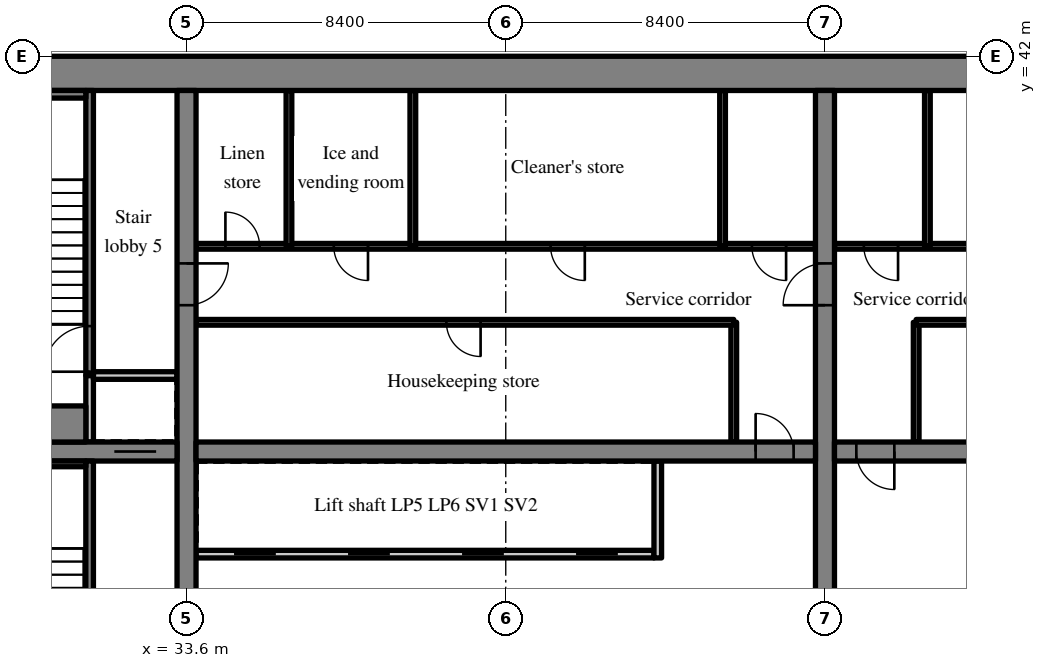
"""IFC4 building model, lengths in metres.
Left out: names, types, materials, properties, quantities, classifications, styles, units other than length and angle.
Written with IfcOpenShell. Run it as: python <this file> out.ifc"""

import sys

from ifc_helpers import new_model, si_unit, direction, frame, frame_2d, origin, place, context, subcontext, project, spatial, rectangle, extrude, source, transform, mapped, element, fill, save


model = new_model("IFC4")
c1 = context("Model", 3, precision=1e-05, world=origin(), true_north=direction((0.0, 1.0)))
c2 = subcontext(c1, "Body", "Model", "MODEL_VIEW")
j1 = project(units=[si_unit("LENGTHUNIT", "METRE"), si_unit("PLANEANGLEUNIT", "RADIAN")], contexts=[c1])
p1 = place(None, origin())
s1 = spatial("IfcSite", under=j1, at=p1, CompositionType="ELEMENT")
p2 = place(p1, origin())
s2 = spatial("IfcBuilding", under=s1, at=p2, CompositionType="ELEMENT")
p3 = place(p2, frame((0.0, 0.0, 129.4)))
s3 = spatial("IfcBuildingStorey", under=s2, at=p3, CompositionType="ELEMENT", Elevation=129.4)
m1 = source(origin(), c2, "Body", "SweptSolid", [
    extrude(rectangle(XDim=50.4, YDim=0.9, at=frame_2d((25.2, 0.0))), origin(), (0.0, 0.0, 1.0), 3.52),
])
p4 = place(p3, frame((25.2, 41.55, 0.0), z_axis=(0.0, 0.0, 1.0), x_axis=(1.0, 0.0, 0.0)))
e1 = element("IfcWall", 1, at=p4, inside=s3, PredefinedType="SHEAR", context=c2, shape_type="MappedRepresentation", body=[
    mapped(m1, transform((0.0, 0.0, 0.0), scale=1.0)),
])
m2 = source(origin(), c2, "Body", "SweptSolid", [
    extrude(rectangle(XDim=18.2, YDim=0.5, at=frame_2d((9.1, 0.0))), origin(), (0.0, 0.0, 1.0), 3.52),
])
p5 = place(p3, frame((33.6, 22.9, 0.0), z_axis=(0.0, 0.0, 1.0), x_axis=(0.0, 1.0, 0.0)))
e2 = element("IfcWall", 2, at=p5, inside=s3, PredefinedType="SHEAR", context=c2, shape_type="MappedRepresentation", body=[
    mapped(m2, transform((0.0, 0.0, 0.0), scale=1.0)),
])
m3 = source(origin(), c2, "Body", "SweptSolid", [
    extrude(rectangle(XDim=1.1, YDim=2.1, at=frame_2d((0.55, 1.05))), frame((0.0, 0.26, 0.0), z_axis=(0.0, -1.0, 0.0), x_axis=(1.0, 0.0, 0.0)), (0.0, 0.0, 1.0), 0.52),
])
p6 = place(p5, frame((12.55, 0.0, 0.0)))
e3 = element("IfcOpeningElement", 3, at=p6, cuts=e2, PredefinedType="OPENING", context=c2, shape_type="MappedRepresentation", body=[
    mapped(m3, transform((0.0, 0.0, 0.0), scale=1.0)),
])
p7 = place(p3, frame((50.4, 22.9, 0.0), z_axis=(0.0, 0.0, 1.0), x_axis=(0.0, 1.0, 0.0)))
e4 = element("IfcWall", 4, at=p7, inside=s3, PredefinedType="SHEAR", context=c2, shape_type="MappedRepresentation", body=[
    mapped(m2, transform((0.0, 0.0, 0.0), scale=1.0)),
])
p8 = place(p7, frame((12.55, 0.0, 0.0)))
e5 = element("IfcOpeningElement", 5, at=p8, cuts=e4, PredefinedType="OPENING", context=c2, shape_type="MappedRepresentation", body=[
    mapped(m3, transform((0.0, 0.0, 0.0), scale=1.0)),
])
m4 = source(origin(), c2, "Body", "SweptSolid", [
    extrude(rectangle(XDim=7.25, YDim=0.5, at=frame_2d((3.625, 0.0))), origin(), (0.0, 0.0, 1.0), 3.52),
])
p9 = place(p3, frame((26.1, 31.6, 0.0), z_axis=(0.0, 0.0, 1.0), x_axis=(1.0, 0.0, 0.0)))
e6 = element("IfcWall", 6, at=p9, inside=s3, PredefinedType="SHEAR", context=c2, shape_type="MappedRepresentation", body=[
    mapped(m4, transform((0.0, 0.0, 0.0), scale=1.0)),
])
p10 = place(p9, frame((5.6, 0.0, 0.0)))
e7 = element("IfcOpeningElement", 7, at=p10, cuts=e6, PredefinedType="OPENING", context=c2, shape_type="MappedRepresentation", body=[
    mapped(m3, transform((0.0, 0.0, 0.0), scale=1.0)),
])
m5 = source(origin(), c2, "Body", "SweptSolid", [
    extrude(rectangle(XDim=16.3, YDim=0.5, at=frame_2d((8.15, 0.0))), origin(), (0.0, 0.0, 1.0), 3.52),
])
p11 = place(p3, frame((33.85, 31.6, 0.0), z_axis=(0.0, 0.0, 1.0), x_axis=(1.0, 0.0, 0.0)))
e8 = element("IfcWall", 8, at=p11, inside=s3, PredefinedType="SHEAR", context=c2, shape_type="MappedRepresentation", body=[
    mapped(m5, transform((0.0, 0.0, 0.0), scale=1.0)),
])
m6 = source(origin(), c2, "Body", "SweptSolid", [
    extrude(rectangle(XDim=1.0, YDim=2.1, at=frame_2d((0.5, 1.05))), frame((0.0, 0.26, 0.0), z_axis=(0.0, -1.0, 0.0), x_axis=(1.0, 0.0, 0.0)), (0.0, 0.0, 1.0), 0.52),
])
p12 = place(p11, frame((14.725, 0.0, 0.0)))
e9 = element("IfcOpeningElement", 9, at=p12, cuts=e8, PredefinedType="OPENING", context=c2, shape_type="MappedRepresentation", body=[
    mapped(m6, transform((0.0, 0.0, 0.0), scale=1.0)),
])
m7 = source(origin(), c2, "Body", "SweptSolid", [
    extrude(rectangle(XDim=16.3, YDim=0.5, at=frame_2d((8.15, 0.0))), origin(), (0.0, 0.0, 1.0), 3.52),
])
p13 = place(p3, frame((50.65, 31.6, 0.0), z_axis=(0.0, 0.0, 1.0), x_axis=(1.0, 0.0, 0.0)))
e10 = element("IfcWall", 10, at=p13, inside=s3, PredefinedType="SHEAR", context=c2, shape_type="MappedRepresentation", body=[
    mapped(m7, transform((0.0, 0.0, 0.0), scale=1.0)),
])
p14 = place(p13, frame((0.575, 0.0, 0.0)))
e11 = element("IfcOpeningElement", 11, at=p14, cuts=e10, PredefinedType="OPENING", context=c2, shape_type="MappedRepresentation", body=[
    mapped(m6, transform((0.0, 0.0, 0.0), scale=1.0)),
])
m8 = source(origin(), c2, "Body", "SweptSolid", [
    extrude(rectangle(XDim=12.05, YDim=0.2, at=frame_2d((6.025, 0.0))), origin(), (0.0, 0.0, 1.0), 3.52),
])
p15 = place(p3, frame((33.85, 28.9, 0.0), z_axis=(0.0, 0.0, 1.0), x_axis=(1.0, 0.0, 0.0)))
e12 = element("IfcWall", 12, at=p15, inside=s3, PredefinedType="SOLIDWALL", context=c2, shape_type="MappedRepresentation", body=[
    mapped(m8, transform((0.0, 0.0, 0.0), scale=1.0)),
])
m9 = source(origin(), c2, "Body", "SweptSolid", [
    extrude(rectangle(XDim=1.1, YDim=2.1, at=frame_2d((0.55, 1.05))), frame((0.0, 0.11, 0.0), z_axis=(0.0, -1.0, 0.0), x_axis=(1.0, 0.0, 0.0)), (0.0, 0.0, 1.0), 0.22),
])
p16 = place(p15, frame((1.0, 0.0, 0.0)))
e13 = element("IfcOpeningElement", 13, at=p16, cuts=e12, PredefinedType="OPENING", context=c2, shape_type="MappedRepresentation", body=[
    mapped(m9, transform((0.0, 0.0, 0.0), scale=1.0)),
])
p17 = place(p15, frame((4.0, 0.0, 0.0)))
e14 = element("IfcOpeningElement", 14, at=p17, cuts=e12, PredefinedType="OPENING", context=c2, shape_type="MappedRepresentation", body=[
    mapped(m9, transform((0.0, 0.0, 0.0), scale=1.0)),
])
p18 = place(p15, frame((7.0, 0.0, 0.0)))
e15 = element("IfcOpeningElement", 15, at=p18, cuts=e12, PredefinedType="OPENING", context=c2, shape_type="MappedRepresentation", body=[
    mapped(m9, transform((0.0, 0.0, 0.0), scale=1.0)),
])
p19 = place(p15, frame((10.0, 0.0, 0.0)))
e16 = element("IfcOpeningElement", 16, at=p19, cuts=e12, PredefinedType="OPENING", context=c2, shape_type="MappedRepresentation", body=[
    mapped(m9, transform((0.0, 0.0, 0.0), scale=1.0)),
])
m10 = source(origin(), c2, "Body", "SweptSolid", [
    extrude(rectangle(XDim=2.55, YDim=0.2, at=frame_2d((1.275, 0.0))), origin(), (0.0, 0.0, 1.0), 3.52),
])
p20 = place(p3, frame((46.0, 28.8, 0.0), z_axis=(0.0, 0.0, 1.0), x_axis=(0.0, 1.0, 0.0)))
e17 = element("IfcWall", 17, at=p20, inside=s3, PredefinedType="SOLIDWALL", context=c2, shape_type="MappedRepresentation", body=[
    mapped(m10, transform((0.0, 0.0, 0.0), scale=1.0)),
])
m11 = source(origin(), c2, "Body", "SweptSolid", [
    extrude(rectangle(XDim=3.15, YDim=0.15, at=frame_2d((1.575, 0.0))), origin(), (0.0, 0.0, 1.0), 3.52),
])
p21 = place(p3, frame((48.0, 31.85, 0.0), z_axis=(0.0, 0.0, 1.0), x_axis=(0.0, 1.0, 0.0)))
e18 = element("IfcWall", 18, at=p21, inside=s3, PredefinedType="PARTITIONING", context=c2, shape_type="MappedRepresentation", body=[
    mapped(m11, transform((0.0, 0.0, 0.0), scale=1.0)),
])
m12 = source(origin(), c2, "Body", "SweptSolid", [
    extrude(rectangle(XDim=14.15, YDim=0.15, at=frame_2d((7.075, 0.0))), origin(), (0.0, 0.0, 1.0), 3.52),
])
p22 = place(p3, frame((33.85, 35.0, 0.0), z_axis=(0.0, 0.0, 1.0), x_axis=(1.0, 0.0, 0.0)))
e19 = element("IfcWall", 19, at=p22, inside=s3, PredefinedType="PARTITIONING", context=c2, shape_type="MappedRepresentation", body=[
    mapped(m12, transform((0.0, 0.0, 0.0), scale=1.0)),
])
m13 = source(origin(), c2, "Body", "SweptSolid", [
    extrude(rectangle(XDim=0.9, YDim=2.1, at=frame_2d((0.45, 1.05))), frame((0.0, 0.085, 0.0), z_axis=(0.0, -1.0, 0.0), x_axis=(1.0, 0.0, 0.0)), (0.0, 0.0, 1.0), 0.17),
])
p23 = place(p22, frame((6.588, 0.0, 0.0)))
e20 = element("IfcOpeningElement", 20, at=p23, cuts=e19, PredefinedType="OPENING", context=c2, shape_type="MappedRepresentation", body=[
    mapped(m13, transform((0.0, 0.0, 0.0), scale=1.0)),
])
m14 = source(origin(), c2, "Body", "SweptSolid", [
    extrude(rectangle(XDim=16.3, YDim=0.15, at=frame_2d((8.15, 0.0))), origin(), (0.0, 0.0, 1.0), 3.52),
])
p24 = place(p3, frame((33.85, 37.0, 0.0), z_axis=(0.0, 0.0, 1.0), x_axis=(1.0, 0.0, 0.0)))
e21 = element("IfcWall", 21, at=p24, inside=s3, PredefinedType="PARTITIONING", context=c2, shape_type="MappedRepresentation", body=[
    mapped(m14, transform((0.0, 0.0, 0.0), scale=1.0)),
])
p25 = place(p24, frame((0.773, 0.0, 0.0)))
e22 = element("IfcOpeningElement", 22, at=p25, cuts=e21, PredefinedType="OPENING", context=c2, shape_type="MappedRepresentation", body=[
    mapped(m13, transform((0.0, 0.0, 0.0), scale=1.0)),
])
p26 = place(p24, frame((3.625, 0.0, 0.0)))
e23 = element("IfcOpeningElement", 23, at=p26, cuts=e21, PredefinedType="OPENING", context=c2, shape_type="MappedRepresentation", body=[
    mapped(m13, transform((0.0, 0.0, 0.0), scale=1.0)),
])
p27 = place(p24, frame((9.33, 0.0, 0.0)))
e24 = element("IfcOpeningElement", 24, at=p27, cuts=e21, PredefinedType="OPENING", context=c2, shape_type="MappedRepresentation", body=[
    mapped(m13, transform((0.0, 0.0, 0.0), scale=1.0)),
])
p28 = place(p24, frame((14.627, 0.0, 0.0)))
e25 = element("IfcOpeningElement", 25, at=p28, cuts=e21, PredefinedType="OPENING", context=c2, shape_type="MappedRepresentation", body=[
    mapped(m13, transform((0.0, 0.0, 0.0), scale=1.0)),
])
m15 = source(origin(), c2, "Body", "SweptSolid", [
    extrude(rectangle(XDim=4.1, YDim=0.15, at=frame_2d((2.05, 0.0))), origin(), (0.0, 0.0, 1.0), 3.52),
])
for number, where, z_axis, x_axis in (
    (26, (36.295, 37.0, 0.0), (0.0, 0.0, 1.0), (0.0, 1.0, 0.0)),
    (27, (39.555, 37.0, 0.0), (0.0, 0.0, 1.0), (0.0, 1.0, 0.0)),
    (28, (47.705, 37.0, 0.0), (0.0, 0.0, 1.0), (0.0, 1.0, 0.0)),
):
    element("IfcWall", number, at=place(p3, frame(where, z_axis=z_axis, x_axis=x_axis)), inside=s3, PredefinedType="PARTITIONING", context=c2, shape_type="MappedRepresentation", body=[
        mapped(m15, transform((0.0, 0.0, 0.0), scale=1.0)),
    ])
p29 = place(p3, frame((52.8, 31.85, 0.0), z_axis=(0.0, 0.0, 1.0), x_axis=(0.0, 1.0, 0.0)))
e29 = element("IfcWall", 29, at=p29, inside=s3, PredefinedType="PARTITIONING", context=c2, shape_type="MappedRepresentation", body=[
    mapped(m11, transform((0.0, 0.0, 0.0), scale=1.0)),
])
p30 = place(p3, frame((66.95, 35.0, 0.0), z_axis=(0.0, 0.0, 1.0), x_axis=(-1.0, 0.0, 0.0)))
e30 = element("IfcWall", 30, at=p30, inside=s3, PredefinedType="PARTITIONING", context=c2, shape_type="MappedRepresentation", body=[
    mapped(m12, transform((0.0, 0.0, 0.0), scale=1.0)),
])
p31 = place(p30, frame((3.421, 0.0, 0.0)))
e31 = element("IfcOpeningElement", 31, at=p31, cuts=e30, PredefinedType="OPENING", context=c2, shape_type="MappedRepresentation", body=[
    mapped(m13, transform((0.0, 0.0, 0.0), scale=1.0)),
])
p32 = place(p30, frame((10.458, 0.0, 0.0)))
e32 = element("IfcOpeningElement", 32, at=p32, cuts=e30, PredefinedType="OPENING", context=c2, shape_type="MappedRepresentation", body=[
    mapped(m13, transform((0.0, 0.0, 0.0), scale=1.0)),
])
m16 = source(origin(), c2, "Body", "SweptSolid", [
    extrude(rectangle(XDim=16.3, YDim=0.15, at=frame_2d((8.15, 0.0))), origin(), (0.0, 0.0, 1.0), 3.52),
])
p33 = place(p3, frame((66.95, 37.0, 0.0), z_axis=(0.0, 0.0, 1.0), x_axis=(-1.0, 0.0, 0.0)))
e33 = element("IfcWall", 33, at=p33, inside=s3, PredefinedType="PARTITIONING", context=c2, shape_type="MappedRepresentation", body=[
    mapped(m16, transform((0.0, 0.0, 0.0), scale=1.0)),
])
p34 = place(p33, frame((6.478, 0.0, 0.0)))
e34 = element("IfcOpeningElement", 34, at=p34, cuts=e33, PredefinedType="OPENING", context=c2, shape_type="MappedRepresentation", body=[
    mapped(m13, transform((0.0, 0.0, 0.0), scale=1.0)),
])
p35 = place(p33, frame((14.627, 0.0, 0.0)))
e35 = element("IfcOpeningElement", 35, at=p35, cuts=e33, PredefinedType="OPENING", context=c2, shape_type="MappedRepresentation", body=[
    mapped(m13, transform((0.0, 0.0, 0.0), scale=1.0)),
])
p36 = place(p3, frame((53.095, 37.0, 0.0), z_axis=(0.0, 0.0, 1.0), x_axis=(0.0, 1.0, 0.0)))
e36 = element("IfcWall", 36, at=p36, inside=s3, PredefinedType="PARTITIONING", context=c2, shape_type="MappedRepresentation", body=[
    mapped(m15, transform((0.0, 0.0, 0.0), scale=1.0)),
])
m17 = source(origin(), c2, "Body", "SweptSolid", [
    extrude(rectangle(XDim=8.45, YDim=0.2, at=frame_2d((4.225, 0.0))), origin(), (0.0, 0.0, 1.0), 3.52),
])
p37 = place(p3, frame((31.05, 22.9, 0.0), z_axis=(0.0, 0.0, 1.0), x_axis=(0.0, 1.0, 0.0)))
e37 = element("IfcWall", 37, at=p37, inside=s3, PredefinedType="SOLIDWALL", context=c2, shape_type="MappedRepresentation", body=[
    mapped(m17, transform((0.0, 0.0, 0.0), scale=1.0)),
])
m18 = source(origin(), c2, "Body", "SweptSolid", [
    extrude(rectangle(XDim=1.2, YDim=2.1, at=frame_2d((0.6, 1.05))), frame((0.0, 0.11, 0.0), z_axis=(0.0, -1.0, 0.0), x_axis=(1.0, 0.0, 0.0)), (0.0, 0.0, 1.0), 0.22),
])
p38 = place(p37, frame((0.7, 0.0, 0.0)))
e38 = element("IfcOpeningElement", 38, at=p38, cuts=e37, PredefinedType="OPENING", context=c2, shape_type="MappedRepresentation", body=[
    mapped(m18, transform((0.0, 0.0, 0.0), scale=1.0)),
])
m19 = source(origin(), c2, "Body", "SweptSolid", [
    extrude(rectangle(XDim=1.75, YDim=0.2, at=frame_2d((0.875, 0.0))), origin(), (0.0, 0.0, 1.0), 3.52),
])
p39 = place(p3, frame((31.05, 31.85, 0.0), z_axis=(0.0, 0.0, 1.0), x_axis=(0.0, 1.0, 0.0)))
e39 = element("IfcWall", 39, at=p39, inside=s3, PredefinedType="SOLIDWALL", context=c2, shape_type="MappedRepresentation", body=[
    mapped(m19, transform((0.0, 0.0, 0.0), scale=1.0)),
])
m20 = source(origin(), c2, "Body", "SweptSolid", [
    extrude(rectangle(XDim=2.2, YDim=0.2, at=frame_2d((1.1, 0.0))), origin(), (0.0, 0.0, 1.0), 3.52),
])
p40 = place(p3, frame((31.15, 33.6, 0.0), z_axis=(0.0, 0.0, 1.0), x_axis=(1.0, 0.0, 0.0)))
e40 = element("IfcWall", 40, at=p40, inside=s3, PredefinedType="SOLIDWALL", context=c2, shape_type="MappedRepresentation", body=[
    mapped(m20, transform((0.0, 0.0, 0.0), scale=1.0)),
])
m21 = source(origin(), c2, "Body", "SweptSolid", [
    extrude(rectangle(XDim=7.5, YDim=0.2, at=frame_2d((3.75, 0.0))), origin(), (0.0, 0.0, 1.0), 3.52),
])
p41 = place(p3, frame((31.05, 33.6, 0.0), z_axis=(0.0, 0.0, 1.0), x_axis=(0.0, 1.0, 0.0)))
e41 = element("IfcWall", 41, at=p41, inside=s3, PredefinedType="SOLIDWALL", context=c2, shape_type="MappedRepresentation", body=[
    mapped(m21, transform((0.0, 0.0, 0.0), scale=1.0)),
])
p42 = place(p41, frame((0.1, 0.0, 0.0)))
e42 = element("IfcOpeningElement", 42, at=p42, cuts=e41, PredefinedType="OPENING", context=c2, shape_type="MappedRepresentation", body=[
    mapped(m18, transform((0.0, 0.0, 0.0), scale=1.0)),
])
m22 = source(origin(), c2, "Body", "SweptSolid", [
    extrude(rectangle(XDim=4.85, YDim=0.15, at=frame_2d((2.425, 0.0))), origin(), (0.0, 0.0, 1.0), 3.52),
])
p43 = place(p3, frame((26.1, 31.275, 0.0), z_axis=(0.0, 0.0, 1.0), x_axis=(1.0, 0.0, 0.0)))
e43 = element("IfcWall", 43, at=p43, inside=s3, PredefinedType="SOLIDWALL", context=c2, shape_type="MappedRepresentation", body=[
    mapped(m22, transform((0.0, 0.0, 0.0), scale=1.0)),
])
m23 = source(origin(), c2, "Body", "SweptSolid", [
    extrude(rectangle(XDim=4.85, YDim=0.2, at=frame_2d((2.425, 0.0))), origin(), (0.0, 0.0, 1.0), 3.52),
])
p44 = place(p3, frame((26.1, 41.0, 0.0), z_axis=(0.0, 0.0, 1.0), x_axis=(1.0, 0.0, 0.0)))
e44 = element("IfcWall", 44, at=p44, inside=s3, PredefinedType="SOLIDWALL", context=c2, shape_type="MappedRepresentation", body=[
    mapped(m23, transform((0.0, 0.0, 0.0), scale=1.0)),
])
m24 = source(origin(), c2, "Body", "SweptSolid", [
    extrude(rectangle(XDim=4.85, YDim=0.95, at=frame_2d((2.425, 0.0))), origin(), (0.0, 0.0, 1.0), 3.52),
])
p45 = place(p3, frame((26.1, 32.325, 0.0), z_axis=(0.0, 0.0, 1.0), x_axis=(1.0, 0.0, 0.0)))
e45 = element("IfcWall", 45, at=p45, inside=s3, PredefinedType="SOLIDWALL", context=c2, shape_type="MappedRepresentation", body=[
    mapped(m24, transform((0.0, 0.0, 0.0), scale=1.0)),
])
m25 = source(origin(), c2, "Body", "SweptSolid", [
    extrude(rectangle(XDim=1.0, YDim=2.1, at=frame_2d((0.5, 1.05))), frame((0.0, 0.025, 0.0), z_axis=(0.0, -1.0, 0.0), x_axis=(1.0, 0.0, 0.0)), (0.0, 0.0, 1.0), 0.05),
])
p46 = place(p12, origin())
e46 = element("IfcDoor", 46, at=p46, inside=s3, OperationType="SINGLE_SWING_LEFT", PredefinedType="DOOR", context=c2, shape_type="MappedRepresentation", body=[
    mapped(m25, transform((0.0, 0.0, 0.0), scale=1.0)),
])
fill(e9, e46)
m26 = source(origin(), c2, "Body", "SweptSolid", [
    extrude(rectangle(XDim=1.1, YDim=2.1, at=frame_2d((0.55, 1.05))), frame((0.0, 0.025, 0.0), z_axis=(0.0, -1.0, 0.0), x_axis=(1.0, 0.0, 0.0)), (0.0, 0.0, 1.0), 0.05),
])
p47 = place(p16, origin())
e47 = element("IfcDoor", 47, at=p47, inside=s3, OperationType="SLIDING_TO_LEFT", PredefinedType="DOOR", context=c2, shape_type="MappedRepresentation", body=[
    mapped(m26, transform((0.0, 0.0, 0.0), scale=1.0)),
])
fill(e13, e47)
p48 = place(p17, origin())
e48 = element("IfcDoor", 48, at=p48, inside=s3, OperationType="SLIDING_TO_RIGHT", PredefinedType="DOOR", context=c2, shape_type="MappedRepresentation", body=[
    mapped(m26, transform((0.0, 0.0, 0.0), scale=1.0)),
])
fill(e14, e48)
p49 = place(p18, origin())
e49 = element("IfcDoor", 49, at=p49, inside=s3, OperationType="SLIDING_TO_LEFT", PredefinedType="DOOR", context=c2, shape_type="MappedRepresentation", body=[
    mapped(m26, transform((0.0, 0.0, 0.0), scale=1.0)),
])
fill(e15, e49)
p50 = place(p19, origin())
e50 = element("IfcDoor", 50, at=p50, inside=s3, OperationType="SLIDING_TO_RIGHT", PredefinedType="DOOR", context=c2, shape_type="MappedRepresentation", body=[
    mapped(m26, transform((0.0, 0.0, 0.0), scale=1.0)),
])
fill(e16, e50)
m27 = source(origin(), c2, "Body", "SweptSolid", [
    extrude(rectangle(XDim=0.9, YDim=2.1, at=frame_2d((0.45, 1.05))), frame((0.0, 0.025, 0.0), z_axis=(0.0, -1.0, 0.0), x_axis=(1.0, 0.0, 0.0)), (0.0, 0.0, 1.0), 0.05),
])
p51 = place(p23, origin())
e51 = element("IfcDoor", 51, at=p51, inside=s3, OperationType="SINGLE_SWING_RIGHT", PredefinedType="DOOR", context=c2, shape_type="MappedRepresentation", body=[
    mapped(m27, transform((0.0, 0.0, 0.0), scale=1.0)),
])
fill(e20, e51)
p52 = place(p25, origin())
e52 = element("IfcDoor", 52, at=p52, inside=s3, OperationType="SINGLE_SWING_LEFT", PredefinedType="DOOR", context=c2, shape_type="MappedRepresentation", body=[
    mapped(m27, transform((0.0, 0.0, 0.0), scale=1.0)),
])
fill(e22, e52)
p53 = place(p26, origin())
e53 = element("IfcDoor", 53, at=p53, inside=s3, OperationType="SINGLE_SWING_RIGHT", PredefinedType="DOOR", context=c2, shape_type="MappedRepresentation", body=[
    mapped(m27, transform((0.0, 0.0, 0.0), scale=1.0)),
])
fill(e23, e53)
p54 = place(p27, origin())
e54 = element("IfcDoor", 54, at=p54, inside=s3, OperationType="SINGLE_SWING_RIGHT", PredefinedType="DOOR", context=c2, shape_type="MappedRepresentation", body=[
    mapped(m27, transform((0.0, 0.0, 0.0), scale=1.0)),
])
fill(e24, e54)
p55 = place(p28, origin())
e55 = element("IfcDoor", 55, at=p55, inside=s3, OperationType="SINGLE_SWING_RIGHT", PredefinedType="DOOR", context=c2, shape_type="MappedRepresentation", body=[
    mapped(m27, transform((0.0, 0.0, 0.0), scale=1.0)),
])
fill(e25, e55)
p56 = place(p14, origin())
e56 = element("IfcDoor", 56, at=p56, inside=s3, OperationType="SINGLE_SWING_RIGHT", PredefinedType="DOOR", context=c2, shape_type="MappedRepresentation", body=[
    mapped(m25, transform((0.0, 0.0, 0.0), scale=1.0)),
])
fill(e11, e56)
p57 = place(p35, origin())
e57 = element("IfcDoor", 57, at=p57, inside=s3, OperationType="SINGLE_SWING_LEFT", PredefinedType="DOOR", context=c2, shape_type="MappedRepresentation", body=[
    mapped(m27, transform((0.0, 0.0, 0.0), scale=1.0)),
])
fill(e35, e57)
p58 = place(p10, origin())
e58 = element("IfcDoor", 58, at=p58, inside=s3, OperationType="SLIDING_TO_LEFT", PredefinedType="DOOR", context=c2, shape_type="MappedRepresentation", body=[
    mapped(m26, transform((0.0, 0.0, 0.0), scale=1.0)),
])
fill(e7, e58)
m28 = source(origin(), c2, "Body", "SweptSolid", [
    extrude(rectangle(XDim=1.2, YDim=2.1, at=frame_2d((0.6, 1.05))), frame((0.0, 0.025, 0.0), z_axis=(0.0, -1.0, 0.0), x_axis=(1.0, 0.0, 0.0)), (0.0, 0.0, 1.0), 0.05),
])
p59 = place(p42, origin())
e59 = element("IfcDoor", 59, at=p59, inside=s3, OperationType="SINGLE_SWING_LEFT", PredefinedType="DOOR", context=c2, shape_type="MappedRepresentation", body=[
    mapped(m28, transform((0.0, 0.0, 0.0), scale=1.0)),
])
fill(e42, e59)
p60 = place(p6, origin())
e60 = element("IfcDoor", 60, at=p60, inside=s3, OperationType="SINGLE_SWING_RIGHT", PredefinedType="DOOR", context=c2, shape_type="MappedRepresentation", body=[
    mapped(m26, transform((0.0, 0.0, 0.0), scale=1.0)),
])
fill(e3, e60)
p61 = place(p8, origin())
e61 = element("IfcDoor", 61, at=p61, inside=s3, OperationType="SINGLE_SWING_LEFT", PredefinedType="DOOR", context=c2, shape_type="MappedRepresentation", body=[
    mapped(m26, transform((0.0, 0.0, 0.0), scale=1.0)),
])
fill(e5, e61)
save(model, sys.argv[1])
